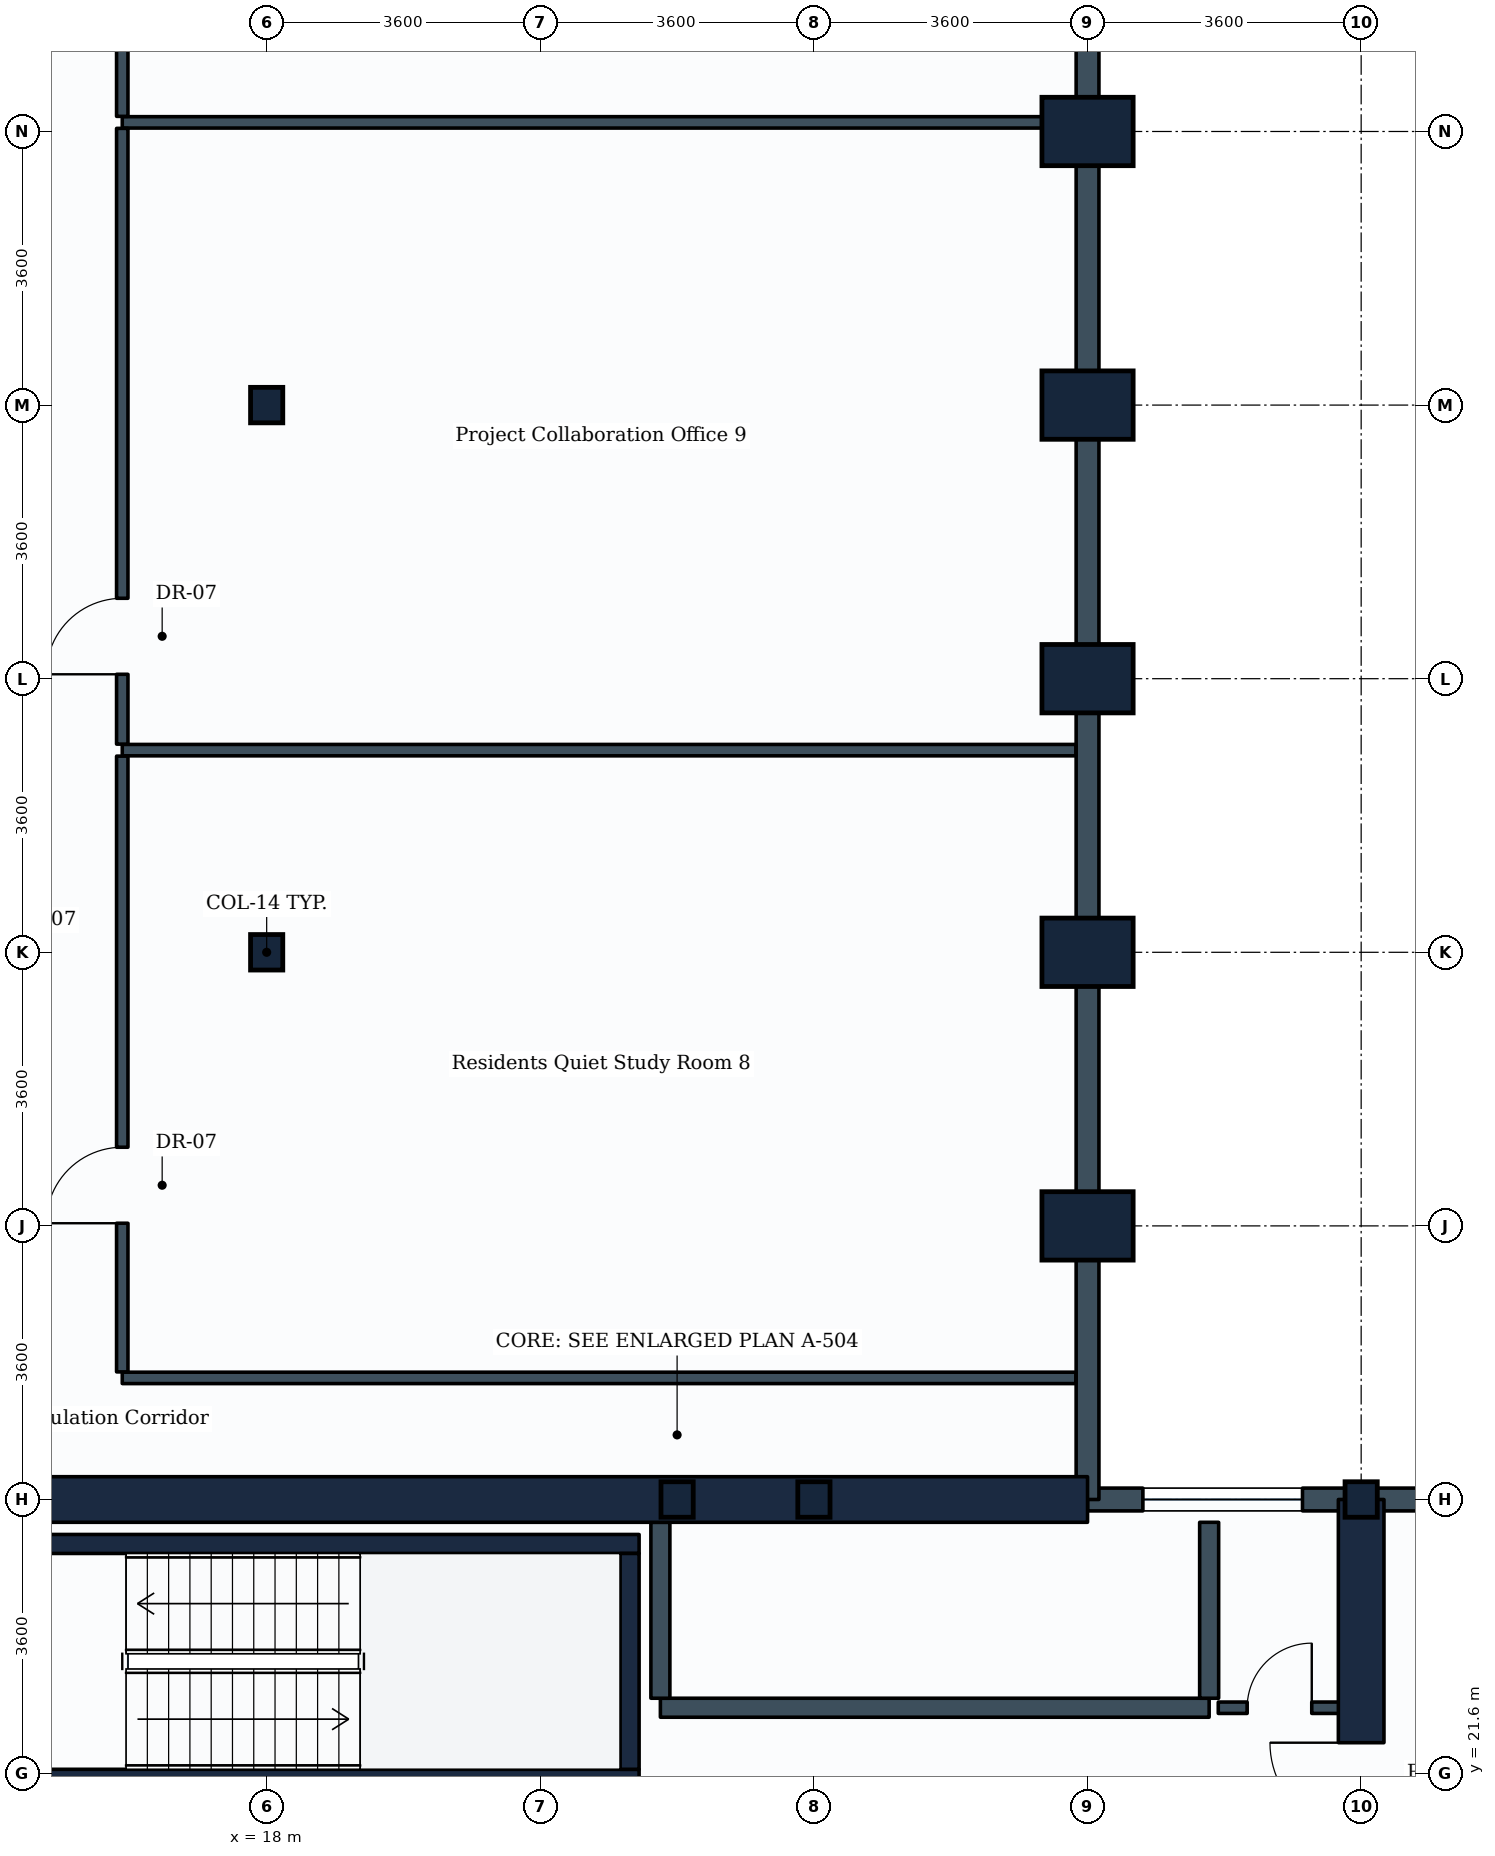
"""IFC4 building model, lengths in metres.
Left out: names, types, materials, properties, quantities, classifications, styles, units other than length and angle.
Written with IfcOpenShell. Run it as: python <this file> out.ifc"""

import sys

from ifc_helpers import new_model, si_unit, direction, frame, frame_2d, origin, origin_2d, place, context, subcontext, project, spatial, rectangle, i_section, extrude, element, fill, save


model = new_model("IFC4")
c1 = context("Model", 3, precision=1e-05, world=origin(), true_north=direction((0.0, 1.0)))
c2 = subcontext(c1, "Body", "Model", "MODEL_VIEW")
j1 = project(units=[si_unit("LENGTHUNIT", "METRE"), si_unit("PLANEANGLEUNIT", "RADIAN")], contexts=[c1])
p1 = place(None, origin())
s1 = spatial("IfcSite", under=j1, at=p1, CompositionType="ELEMENT")
p2 = place(p1, origin())
s2 = spatial("IfcBuilding", under=s1, at=p2, CompositionType="ELEMENT")
p3 = place(p2, frame((0.0, 0.0, 59.1)))
s3 = spatial("IfcBuildingStorey", under=s2, at=p3, CompositionType="ELEMENT", Elevation=59.1)
for number, where, z_axis, x_axis in (
    (1, (18.0, 32.4, 0.0), (0.0, 0.0, 1.0), (1.0, 0.0, 0.0)),
    (2, (18.0, 39.6, 0.0), (0.0, 0.0, 1.0), (1.0, 0.0, 0.0)),
    (3, (23.4, 25.2, 0.0), (0.0, 0.0, 1.0), (1.0, 0.0, 0.0)),
    (4, (25.2, 25.2, 0.0), (0.0, 0.0, 1.0), (1.0, 0.0, 0.0)),
):
    element("IfcColumn", number, at=place(p3, frame(where, z_axis=z_axis, x_axis=x_axis)), inside=s3, PredefinedType="COLUMN", context=c2, shape_type="SweptSolid", body=[
        extrude(i_section(OverallWidth=0.424, OverallDepth=0.467, WebThickness=0.033, FlangeThickness=0.053, FilletRadius=0.015, at=origin_2d()), origin(), (0.0, 0.0, 1.0), 3.9),
    ])
for number, where, z_axis, x_axis in (
    (5, (28.8, 28.8, 0.0), (0.0, 0.0, 1.0), (0.0, 1.0, 0.0)),
    (6, (28.8, 32.4, 0.0), (0.0, 0.0, 1.0), (0.0, 1.0, 0.0)),
    (7, (28.8, 36.0, 0.0), (0.0, 0.0, 1.0), (0.0, 1.0, 0.0)),
    (8, (28.8, 39.6, 0.0), (0.0, 0.0, 1.0), (0.0, 1.0, 0.0)),
    (9, (28.8, 43.2, 0.0), (0.0, 0.0, 1.0), (0.0, 1.0, 0.0)),
):
    element("IfcColumn", number, at=place(p3, frame(where, z_axis=z_axis, x_axis=x_axis)), inside=s3, PredefinedType="COLUMN", context=c2, shape_type="SweptSolid", body=[
        extrude(rectangle(XDim=0.9, YDim=1.2, at=origin_2d()), origin(), (0.0, 0.0, 1.0), 3.9),
    ])
p4 = place(p3, frame((32.4, 25.2, 0.0), z_axis=(0.0, 0.0, 1.0), x_axis=(1.0, 0.0, 0.0)))
e10 = element("IfcColumn", 10, at=p4, inside=s3, PredefinedType="COLUMN", context=c2, shape_type="SweptSolid", body=[
    extrude(i_section(OverallWidth=0.424, OverallDepth=0.467, WebThickness=0.033, FlangeThickness=0.053, FilletRadius=0.015, at=origin_2d()), origin(), (0.0, 0.0, 1.0), 3.9),
])
p5 = place(p3, frame((32.4, 25.2, 0.0), z_axis=(0.0, 0.0, 1.0), x_axis=(1.0, 0.0, 0.0)))
e11 = element("IfcWall", 11, at=p5, inside=s3, PredefinedType="STANDARD", context=c2, shape_type="SweptSolid", body=[
    extrude(rectangle(XDim=3.6, YDim=0.3, at=frame_2d((1.8, 0.0))), origin(), (0.0, 0.0, 1.0), 2.93),
])
p6 = place(p3, frame((28.8, 25.2, 0.0), z_axis=(0.0, 0.0, 1.0), x_axis=(1.0, 0.0, 0.0)))
e12 = element("IfcWall", 12, at=p6, inside=s3, PredefinedType="STANDARD", context=c2, shape_type="SweptSolid", body=[
    extrude(rectangle(XDim=3.6, YDim=0.3, at=frame_2d((1.8, 0.0))), origin(), (0.0, 0.0, 1.0), 3.635),
])
p7 = place(p6, frame((0.728, 0.0, 0.85)))
e13 = element("IfcOpeningElement", 13, at=p7, cuts=e12, PredefinedType="OPENING", context=c2, shape_type="SweptSolid", body=[
    extrude(rectangle(XDim=2.1, YDim=1.35, at=frame_2d((1.05, 0.675))), frame((0.0, 0.16, 0.0), z_axis=(0.0, -1.0, 0.0), x_axis=(1.0, 0.0, 0.0)), (0.0, 0.0, 1.0), 0.32),
])
p8 = place(p3, frame((28.8, 25.2, 0.0), z_axis=(0.0, 0.0, 1.0), x_axis=(0.0, 1.0, 0.0)))
e14 = element("IfcWall", 14, at=p8, inside=s3, PredefinedType="STANDARD", context=c2, shape_type="SweptSolid", body=[
    extrude(rectangle(XDim=3.6, YDim=0.3, at=frame_2d((1.8, 0.0))), origin(), (0.0, 0.0, 1.0), 3.14),
])
p9 = place(p3, frame((28.8, 28.8, 0.0), z_axis=(0.0, 0.0, 1.0), x_axis=(0.0, 1.0, 0.0)))
e15 = element("IfcWall", 15, at=p9, inside=s3, PredefinedType="STANDARD", context=c2, shape_type="SweptSolid", body=[
    extrude(rectangle(XDim=3.6, YDim=0.3, at=frame_2d((1.8, 0.0))), origin(), (0.0, 0.0, 1.0), 2.93),
])
for number, where, z_axis, x_axis in (
    (16, (28.8, 32.4, 0.0), (0.0, 0.0, 1.0), (0.0, 1.0, 0.0)),
    (17, (28.8, 36.0, 0.0), (0.0, 0.0, 1.0), (0.0, 1.0, 0.0)),
):
    element("IfcWall", number, at=place(p3, frame(where, z_axis=z_axis, x_axis=x_axis)), inside=s3, PredefinedType="STANDARD", context=c2, shape_type="SweptSolid", body=[
        extrude(rectangle(XDim=3.6, YDim=0.3, at=frame_2d((1.8, 0.0))), origin(), (0.0, 0.0, 1.0), 2.93),
    ])
p10 = place(p3, frame((28.8, 39.6, 0.0), z_axis=(0.0, 0.0, 1.0), x_axis=(0.0, 1.0, 0.0)))
e18 = element("IfcWall", 18, at=p10, inside=s3, PredefinedType="STANDARD", context=c2, shape_type="SweptSolid", body=[
    extrude(rectangle(XDim=3.6, YDim=0.3, at=frame_2d((1.8, 0.0))), origin(), (0.0, 0.0, 1.0), 2.93),
])
p11 = place(p3, frame((28.8, 43.2, 0.0), z_axis=(0.0, 0.0, 1.0), x_axis=(0.0, 1.0, 0.0)))
e19 = element("IfcWall", 19, at=p11, inside=s3, PredefinedType="STANDARD", context=c2, shape_type="SweptSolid", body=[
    extrude(rectangle(XDim=3.6, YDim=0.3, at=frame_2d((1.8, 0.0))), origin(), (0.0, 0.0, 1.0), 2.93),
])
p12 = place(p3, frame((14.4, 25.2, 0.0), z_axis=(0.0, 0.0, 1.0), x_axis=(1.0, 0.0, 0.0)))
e20 = element("IfcWall", 20, at=p12, inside=s3, PredefinedType="SHEAR", context=c2, shape_type="SweptSolid", body=[
    extrude(rectangle(XDim=14.4, YDim=0.6, at=frame_2d((7.2, 0.0))), origin(), (0.0, 0.0, 1.0), 3.65),
])
p13 = place(p3, frame((32.4, 10.8, 0.0), z_axis=(0.0, 0.0, 1.0), x_axis=(0.0, 1.0, 0.0)))
e21 = element("IfcWall", 21, at=p13, inside=s3, PredefinedType="SHEAR", context=c2, shape_type="SweptSolid", body=[
    extrude(rectangle(XDim=14.4, YDim=0.6, at=frame_2d((7.2, 0.0))), origin(), (0.0, 0.0, 1.0), 3.65),
])
p14 = place(p13, frame((4.35, 0.0, 0.0)))
e22 = element("IfcOpeningElement", 22, at=p14, cuts=e21, PredefinedType="OPENING", context=c2, shape_type="SweptSolid", body=[
    extrude(rectangle(XDim=1.2, YDim=2.1, at=frame_2d((0.6, 1.05))), frame((0.0, 0.31, 0.0), z_axis=(0.0, -1.0, 0.0), x_axis=(1.0, 0.0, 0.0)), (0.0, 0.0, 1.0), 0.62),
])
p15 = place(p13, frame((10.0, 0.0, 0.0)))
e23 = element("IfcOpeningElement", 23, at=p15, cuts=e21, PredefinedType="OPENING", context=c2, shape_type="SweptSolid", body=[
    extrude(rectangle(XDim=1.2, YDim=2.1, at=frame_2d((0.6, 1.05))), frame((0.0, 0.31, 0.0), z_axis=(0.0, -1.0, 0.0), x_axis=(1.0, 0.0, 0.0)), (0.0, 0.0, 1.0), 0.62),
])
for number, where, z_axis, x_axis in (
    (24, (14.7, 21.525, 0.0), (0.0, 0.0, 1.0), (1.0, 0.0, 0.0)),
    (25, (14.7, 24.615, 0.0), (0.0, 0.0, 1.0), (1.0, 0.0, 0.0)),
):
    element("IfcWall", number, at=place(p3, frame(where, z_axis=z_axis, x_axis=x_axis)), inside=s3, PredefinedType="SHEAR", context=c2, shape_type="SweptSolid", body=[
        extrude(rectangle(XDim=8.2, YDim=0.25, at=frame_2d((4.1, 0.0))), origin(), (0.0, 0.0, 1.0), 3.65),
    ])
p16 = place(p3, frame((22.775, 21.65, 0.0), z_axis=(0.0, 0.0, 1.0), x_axis=(0.0, 1.0, 0.0)))
e26 = element("IfcWall", 26, at=p16, inside=s3, PredefinedType="SHEAR", context=c2, shape_type="SweptSolid", body=[
    extrude(rectangle(XDim=2.84, YDim=0.25, at=frame_2d((1.42, 0.0))), origin(), (0.0, 0.0, 1.0), 3.65),
])
p17 = place(p3, frame((23.18, 22.46, 0.0), z_axis=(0.0, 0.0, 1.0), x_axis=(1.0, 0.0, 0.0)))
e27 = element("IfcWall", 27, at=p17, inside=s3, PredefinedType="PARTITIONING", context=c2, shape_type="SweptSolid", body=[
    extrude(rectangle(XDim=7.22, YDim=0.25, at=frame_2d((3.61, 0.0))), origin(), (0.0, 0.0, 1.0), 3.635),
])
for number, where, z_axis, x_axis in (
    (28, (23.18, 22.585, 0.0), (0.0, 0.0, 1.0), (0.0, 1.0, 0.0)),
    (29, (30.4, 22.585, 0.0), (0.0, 0.0, 1.0), (0.0, 1.0, 0.0)),
):
    element("IfcWall", number, at=place(p3, frame(where, z_axis=z_axis, x_axis=x_axis)), inside=s3, PredefinedType="PARTITIONING", context=c2, shape_type="SweptSolid", body=[
        extrude(rectangle(XDim=2.315, YDim=0.25, at=frame_2d((1.157, 0.0))), origin(), (0.0, 0.0, 1.0), 3.635),
    ])
p18 = place(p3, frame((30.52, 22.46, 0.0), z_axis=(0.0, 0.0, 1.0), x_axis=(1.0, 0.0, 0.0)))
e30 = element("IfcWall", 30, at=p18, inside=s3, PredefinedType="PARTITIONING", context=c2, shape_type="SweptSolid", body=[
    extrude(rectangle(XDim=1.63, YDim=0.15, at=frame_2d((0.815, 0.0))), origin(), (0.0, 0.0, 1.0), 3.635),
])
p19 = place(p18, frame((0.38, 0.0, 0.0)))
e31 = element("IfcOpeningElement", 31, at=p19, cuts=e30, PredefinedType="OPENING", context=c2, shape_type="SweptSolid", body=[
    extrude(rectangle(XDim=0.85, YDim=2.1, at=frame_2d((0.425, 1.05))), frame((0.0, 0.085, 0.0), z_axis=(0.0, -1.0, 0.0), x_axis=(1.0, 0.0, 0.0)), (0.0, 0.0, 1.0), 0.17),
])
p20 = place(p3, frame((16.1, 26.8, 0.0), z_axis=(0.0, 0.0, 1.0), x_axis=(1.0, 0.0, 0.0)))
e32 = element("IfcWall", 32, at=p20, inside=s3, PredefinedType="PARTITIONING", context=c2, shape_type="SweptSolid", body=[
    extrude(rectangle(XDim=12.546, YDim=0.15, at=frame_2d((6.273, 0.0))), origin(), (0.0, 0.0, 1.0), 3.08),
])
p21 = place(p3, frame((16.1, 35.06, 0.0), z_axis=(0.0, 0.0, 1.0), x_axis=(1.0, 0.0, 0.0)))
e33 = element("IfcWall", 33, at=p21, inside=s3, PredefinedType="PARTITIONING", context=c2, shape_type="SweptSolid", body=[
    extrude(rectangle(XDim=12.546, YDim=0.15, at=frame_2d((6.273, 0.0))), origin(), (0.0, 0.0, 1.0), 2.93),
])
p22 = place(p3, frame((16.1, 26.879, 0.0), z_axis=(0.0, 0.0, 1.0), x_axis=(0.0, 1.0, 0.0)))
e34 = element("IfcWall", 34, at=p22, inside=s3, PredefinedType="PARTITIONING", context=c2, shape_type="SweptSolid", body=[
    extrude(rectangle(XDim=8.102, YDim=0.15, at=frame_2d((4.051, 0.0))), origin(), (0.0, 0.0, 1.0), 3.08),
])
p23 = place(p22, frame((1.956, 0.0, 0.0)))
e35 = element("IfcOpeningElement", 35, at=p23, cuts=e34, PredefinedType="OPENING", context=c2, shape_type="SweptSolid", body=[
    extrude(rectangle(XDim=1.0, YDim=2.1, at=frame_2d((0.5, 1.05))), frame((0.0, 0.085, 0.0), z_axis=(0.0, -1.0, 0.0), x_axis=(1.0, 0.0, 0.0)), (0.0, 0.0, 1.0), 0.17),
])
p24 = place(p3, frame((16.1, 43.32, 0.0), z_axis=(0.0, 0.0, 1.0), x_axis=(1.0, 0.0, 0.0)))
e36 = element("IfcWall", 36, at=p24, inside=s3, PredefinedType="PARTITIONING", context=c2, shape_type="SweptSolid", body=[
    extrude(rectangle(XDim=12.546, YDim=0.15, at=frame_2d((6.273, 0.0))), origin(), (0.0, 0.0, 1.0), 2.93),
])
p25 = place(p3, frame((16.1, 35.139, 0.0), z_axis=(0.0, 0.0, 1.0), x_axis=(0.0, 1.0, 0.0)))
e37 = element("IfcWall", 37, at=p25, inside=s3, PredefinedType="PARTITIONING", context=c2, shape_type="SweptSolid", body=[
    extrude(rectangle(XDim=8.102, YDim=0.15, at=frame_2d((4.051, 0.0))), origin(), (0.0, 0.0, 1.0), 3.08),
])
p26 = place(p25, frame((0.919, 0.0, 0.0)))
e38 = element("IfcOpeningElement", 38, at=p26, cuts=e37, PredefinedType="OPENING", context=c2, shape_type="SweptSolid", body=[
    extrude(rectangle(XDim=1.0, YDim=2.1, at=frame_2d((0.5, 1.05))), frame((0.0, 0.085, 0.0), z_axis=(0.0, -1.0, 0.0), x_axis=(1.0, 0.0, 0.0)), (0.0, 0.0, 1.0), 0.17),
])
p27 = place(p3, frame((16.1, 43.399, 0.0), z_axis=(0.0, 0.0, 1.0), x_axis=(0.0, 1.0, 0.0)))
e39 = element("IfcWall", 39, at=p27, inside=s3, PredefinedType="PARTITIONING", context=c2, shape_type="SweptSolid", body=[
    extrude(rectangle(XDim=6.847, YDim=0.15, at=frame_2d((3.424, 0.0))), origin(), (0.0, 0.0, 1.0), 2.93),
])
p28 = place(p27, frame((2.921, 0.0, 0.0)))
e40 = element("IfcOpeningElement", 40, at=p28, cuts=e39, PredefinedType="OPENING", context=c2, shape_type="SweptSolid", body=[
    extrude(rectangle(XDim=1.0, YDim=2.1, at=frame_2d((0.5, 1.05))), frame((0.0, 0.085, 0.0), z_axis=(0.0, -1.0, 0.0), x_axis=(1.0, 0.0, 0.0)), (0.0, 0.0, 1.0), 0.17),
])
p29 = place(p7, origin())
e41 = element("IfcWindow", 41, at=p29, inside=s3, PartitioningType="SINGLE_PANEL", PredefinedType="WINDOW", context=c2, shape_type="SweptSolid", body=[
    extrude(rectangle(XDim=2.1, YDim=1.35, at=frame_2d((1.05, 0.675))), frame((0.0, 0.03, 0.0), z_axis=(0.0, -1.0, 0.0), x_axis=(1.0, 0.0, 0.0)), (0.0, 0.0, 1.0), 0.06),
])
fill(e13, e41)
p30 = place(p15, origin())
e42 = element("IfcDoor", 42, at=p30, inside=s3, OperationType="SINGLE_SWING_RIGHT", PredefinedType="DOOR", context=c2, shape_type="SweptSolid", body=[
    extrude(rectangle(XDim=1.2, YDim=2.1, at=frame_2d((0.6, 1.05))), frame((0.0, 0.025, 0.0), z_axis=(0.0, -1.0, 0.0), x_axis=(1.0, 0.0, 0.0)), (0.0, 0.0, 1.0), 0.05),
])
fill(e23, e42)
p31 = place(p19, origin())
e43 = element("IfcDoor", 43, at=p31, inside=s3, OperationType="SINGLE_SWING_RIGHT", PredefinedType="DOOR", context=c2, shape_type="SweptSolid", body=[
    extrude(rectangle(XDim=0.85, YDim=2.1, at=frame_2d((0.425, 1.05))), frame((0.0, 0.025, 0.0), z_axis=(0.0, -1.0, 0.0), x_axis=(1.0, 0.0, 0.0)), (0.0, 0.0, 1.0), 0.05),
])
fill(e31, e43)
p32 = place(p23, origin())
e44 = element("IfcDoor", 44, at=p32, inside=s3, OperationType="SINGLE_SWING_LEFT", PredefinedType="DOOR", context=c2, shape_type="SweptSolid", body=[
    extrude(rectangle(XDim=1.0, YDim=2.1, at=frame_2d((0.5, 1.05))), frame((0.0, 0.025, 0.0), z_axis=(0.0, -1.0, 0.0), x_axis=(1.0, 0.0, 0.0)), (0.0, 0.0, 1.0), 0.05),
])
fill(e35, e44)
p33 = place(p26, origin())
e45 = element("IfcDoor", 45, at=p33, inside=s3, OperationType="SINGLE_SWING_LEFT", PredefinedType="DOOR", context=c2, shape_type="SweptSolid", body=[
    extrude(rectangle(XDim=1.0, YDim=2.1, at=frame_2d((0.5, 1.05))), frame((0.0, 0.025, 0.0), z_axis=(0.0, -1.0, 0.0), x_axis=(1.0, 0.0, 0.0)), (0.0, 0.0, 1.0), 0.05),
])
fill(e38, e45)
save(model, sys.argv[1])
